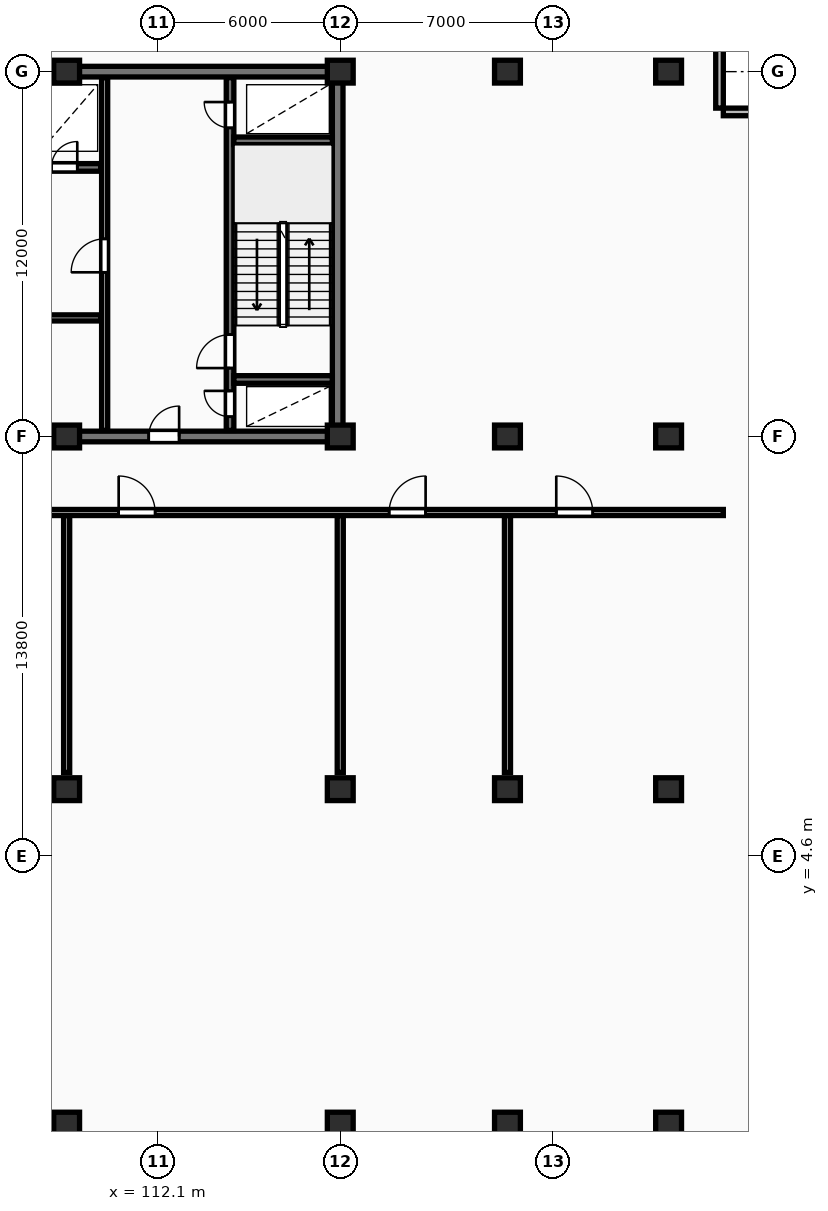
"""IFC4 building model, lengths in metres.
Left out: names, types, materials, properties, quantities, classifications, styles, units other than length and angle.
Written with IfcOpenShell. Run it as: python <this file> out.ifc"""

import sys

from ifc_helpers import new_model, si_unit, direction, frame, frame_2d, origin, origin_2d, place, context, subcontext, project, spatial, rectangle, extrude, element, fill, save


model = new_model("IFC4")
c1 = context("Model", 3, precision=1e-05, world=origin(), true_north=direction((0.0, 1.0)))
c2 = subcontext(c1, "Body", "Model", "MODEL_VIEW")
j1 = project(units=[si_unit("LENGTHUNIT", "METRE"), si_unit("PLANEANGLEUNIT", "RADIAN")], contexts=[c1])
p1 = place(None, origin())
s1 = spatial("IfcSite", under=j1, at=p1, CompositionType="ELEMENT")
p2 = place(p1, origin())
s2 = spatial("IfcBuilding", under=s1, at=p2, CompositionType="ELEMENT")
p3 = place(p2, frame((0.0, 0.0, 157.3)))
s3 = spatial("IfcBuildingStorey", under=s2, at=p3, CompositionType="ELEMENT", Elevation=157.3)
for number, where, z_axis, x_axis in (
    (1, (109.1, -4.2, 0.0), (0.0, 0.0, 1.0), (1.0, 0.0, 0.0)),
    (2, (109.1, 6.8, 0.0), (0.0, 0.0, 1.0), (1.0, 0.0, 0.0)),
    (3, (109.1, 18.4, 0.0), (0.0, 0.0, 1.0), (1.0, 0.0, 0.0)),
    (4, (109.1, 30.4, 0.0), (0.0, 0.0, 1.0), (1.0, 0.0, 0.0)),
    (5, (118.1, -4.2, 0.0), (0.0, 0.0, 1.0), (1.0, 0.0, 0.0)),
    (6, (118.1, 6.8, 0.0), (0.0, 0.0, 1.0), (1.0, 0.0, 0.0)),
    (7, (118.1, 18.4, 0.0), (0.0, 0.0, 1.0), (1.0, 0.0, 0.0)),
    (8, (118.1, 30.4, 0.0), (0.0, 0.0, 1.0), (1.0, 0.0, 0.0)),
    (9, (123.6, -4.2, 0.0), (0.0, 0.0, 1.0), (1.0, 0.0, 0.0)),
    (10, (123.6, 6.8, 0.0), (0.0, 0.0, 1.0), (1.0, 0.0, 0.0)),
    (11, (123.6, 18.4, 0.0), (0.0, 0.0, 1.0), (1.0, 0.0, 0.0)),
    (12, (123.6, 30.4, 0.0), (0.0, 0.0, 1.0), (1.0, 0.0, 0.0)),
    (13, (128.9, -4.2, 0.0), (0.0, 0.0, 1.0), (1.0, 0.0, 0.0)),
    (14, (128.9, 6.8, 0.0), (0.0, 0.0, 1.0), (1.0, 0.0, 0.0)),
    (15, (128.9, 18.4, 0.0), (0.0, 0.0, 1.0), (1.0, 0.0, 0.0)),
    (16, (128.9, 30.4, 0.0), (0.0, 0.0, 1.0), (1.0, 0.0, 0.0)),
):
    element("IfcColumn", number, at=place(p3, frame(where, z_axis=z_axis, x_axis=x_axis)), inside=s3, PredefinedType="COLUMN", context=c2, shape_type="SweptSolid", body=[
        extrude(rectangle(XDim=0.85, YDim=0.75, at=origin_2d()), origin(), (0.0, 0.0, 1.0), 4.8),
    ])
for number, where, z_axis, x_axis in (
    (17, (134.3, 29.075, 0.0), (0.0, 0.0, 1.0), (-1.0, 0.0, 0.0)),
    (18, (130.575, 29.2, 0.0), (0.0, 0.0, 1.0), (0.0, 1.0, 0.0)),
):
    element("IfcWall", number, at=place(p3, frame(where, z_axis=z_axis, x_axis=x_axis)), inside=s3, PredefinedType="SHEAR", context=c2, shape_type="SweptSolid", body=[
        extrude(rectangle(XDim=3.6, YDim=0.25, at=frame_2d((1.8, 0.0))), origin(), (0.0, 0.0, 1.0), 4.48),
    ])
p4 = place(p3, frame((81.925, 30.4, 0.0), z_axis=(0.0, 0.0, 1.0), x_axis=(1.0, 0.0, 0.0)))
e19 = element("IfcWall", 19, at=p4, inside=s3, PredefinedType="SHEAR", context=c2, shape_type="SweptSolid", body=[
    extrude(rectangle(XDim=36.265, YDim=0.35, at=frame_2d((18.132, 0.0))), origin(), (0.0, 0.0, 1.0), 4.8),
])
p5 = place(p3, frame((118.015, 18.575, 0.0), z_axis=(0.0, 0.0, 1.0), x_axis=(0.0, 1.0, 0.0)))
e20 = element("IfcWall", 20, at=p5, inside=s3, PredefinedType="SHEAR", context=c2, shape_type="SweptSolid", body=[
    extrude(rectangle(XDim=11.65, YDim=0.35, at=frame_2d((5.825, 0.0))), origin(), (0.0, 0.0, 1.0), 4.8),
])
p6 = place(p3, frame((81.925, 18.4, 0.0), z_axis=(0.0, 0.0, 1.0), x_axis=(1.0, 0.0, 0.0)))
e21 = element("IfcWall", 21, at=p6, inside=s3, PredefinedType="SHEAR", context=c2, shape_type="SweptSolid", body=[
    extrude(rectangle(XDim=36.265, YDim=0.35, at=frame_2d((18.132, 0.0))), origin(), (0.0, 0.0, 1.0), 4.8),
])
p7 = place(p6, frame((5.675, 0.0, 0.0)))
e22 = element("IfcOpeningElement", 22, at=p7, cuts=e21, PredefinedType="OPENING", context=c2, shape_type="SweptSolid", body=[
    extrude(rectangle(XDim=1.0, YDim=2.15, at=frame_2d((0.5, 1.075))), frame((0.0, 0.185, 0.0), z_axis=(0.0, -1.0, 0.0), x_axis=(1.0, 0.0, 0.0)), (0.0, 0.0, 1.0), 0.37),
])
p8 = place(p6, frame((21.925, 0.0, 0.0)))
e23 = element("IfcOpeningElement", 23, at=p8, cuts=e21, PredefinedType="OPENING", context=c2, shape_type="SweptSolid", body=[
    extrude(rectangle(XDim=1.5, YDim=2.2, at=frame_2d((0.75, 1.1))), frame((0.0, 0.185, 0.0), z_axis=(0.0, -1.0, 0.0), x_axis=(1.0, 0.0, 0.0)), (0.0, 0.0, 1.0), 0.37),
])
p9 = place(p6, frame((29.875, 0.0, 0.0)))
e24 = element("IfcOpeningElement", 24, at=p9, cuts=e21, PredefinedType="OPENING", context=c2, shape_type="SweptSolid", body=[
    extrude(rectangle(XDim=1.0, YDim=2.15, at=frame_2d((0.5, 1.075))), frame((0.0, 0.185, 0.0), z_axis=(0.0, -1.0, 0.0), x_axis=(1.0, 0.0, 0.0)), (0.0, 0.0, 1.0), 0.37),
])
p10 = place(p3, frame((99.68, 27.25, 0.0), z_axis=(0.0, 0.0, 1.0), x_axis=(1.0, 0.0, 0.0)))
e25 = element("IfcWall", 25, at=p10, inside=s3, PredefinedType="SHEAR", context=c2, shape_type="SweptSolid", body=[
    extrude(rectangle(XDim=10.54, YDim=0.25, at=frame_2d((5.27, 0.0))), origin(), (0.0, 0.0, 1.0), 4.8),
])
p11 = place(p10, frame((0.76, 0.0, 0.0)))
e26 = element("IfcOpeningElement", 26, at=p11, cuts=e25, PredefinedType="OPENING", context=c2, shape_type="SweptSolid", body=[
    extrude(rectangle(XDim=1.12, YDim=2.12, at=frame_2d((0.56, 1.06))), frame((0.0, 0.135, 0.0), z_axis=(0.0, -1.0, 0.0), x_axis=(1.0, 0.0, 0.0)), (0.0, 0.0, 1.0), 0.27),
])
p12 = place(p10, frame((3.56, 0.0, 0.0)))
e27 = element("IfcOpeningElement", 27, at=p12, cuts=e25, PredefinedType="OPENING", context=c2, shape_type="SweptSolid", body=[
    extrude(rectangle(XDim=1.12, YDim=2.12, at=frame_2d((0.56, 1.06))), frame((0.0, 0.135, 0.0), z_axis=(0.0, -1.0, 0.0), x_axis=(1.0, 0.0, 0.0)), (0.0, 0.0, 1.0), 0.27),
])
p13 = place(p10, frame((6.36, 0.0, 0.0)))
e28 = element("IfcOpeningElement", 28, at=p13, cuts=e25, PredefinedType="OPENING", context=c2, shape_type="SweptSolid", body=[
    extrude(rectangle(XDim=1.12, YDim=2.12, at=frame_2d((0.56, 1.06))), frame((0.0, 0.135, 0.0), z_axis=(0.0, -1.0, 0.0), x_axis=(1.0, 0.0, 0.0)), (0.0, 0.0, 1.0), 0.27),
])
p14 = place(p10, frame((8.92, 0.0, 0.0)))
e29 = element("IfcOpeningElement", 29, at=p14, cuts=e25, PredefinedType="OPENING", context=c2, shape_type="SweptSolid", body=[
    extrude(rectangle(XDim=0.85, YDim=2.05, at=frame_2d((0.425, 1.025))), frame((0.0, 0.135, 0.0), z_axis=(0.0, -1.0, 0.0), x_axis=(1.0, 0.0, 0.0)), (0.0, 0.0, 1.0), 0.27),
])
p15 = place(p3, frame((91.08, 22.3, 0.0), z_axis=(0.0, 0.0, 1.0), x_axis=(1.0, 0.0, 0.0)))
e30 = element("IfcWall", 30, at=p15, inside=s3, PredefinedType="PARTITIONING", context=c2, shape_type="SweptSolid", body=[
    extrude(rectangle(XDim=19.14, YDim=0.2, at=frame_2d((9.57, 0.0))), origin(), (0.0, 0.0, 1.0), 4.48),
])
p16 = place(p15, frame((1.15, 0.0, 0.0)))
e31 = element("IfcOpeningElement", 31, at=p16, cuts=e30, PredefinedType="OPENING", context=c2, shape_type="SweptSolid", body=[
    extrude(rectangle(XDim=0.85, YDim=2.05, at=frame_2d((0.425, 1.025))), frame((0.0, 0.11, 0.0), z_axis=(0.0, -1.0, 0.0), x_axis=(1.0, 0.0, 0.0)), (0.0, 0.0, 1.0), 0.22),
])
p17 = place(p15, frame((3.2, 0.0, 0.0)))
e32 = element("IfcOpeningElement", 32, at=p17, cuts=e30, PredefinedType="OPENING", context=c2, shape_type="SweptSolid", body=[
    extrude(rectangle(XDim=0.85, YDim=2.05, at=frame_2d((0.425, 1.025))), frame((0.0, 0.11, 0.0), z_axis=(0.0, -1.0, 0.0), x_axis=(1.0, 0.0, 0.0)), (0.0, 0.0, 1.0), 0.22),
])
p18 = place(p15, frame((12.72, 0.0, 0.0)))
e33 = element("IfcOpeningElement", 33, at=p18, cuts=e30, PredefinedType="OPENING", context=c2, shape_type="SweptSolid", body=[
    extrude(rectangle(XDim=1.5, YDim=2.2, at=frame_2d((0.75, 1.1))), frame((0.0, 0.11, 0.0), z_axis=(0.0, -1.0, 0.0), x_axis=(1.0, 0.0, 0.0)), (0.0, 0.0, 1.0), 0.22),
])
p19 = place(p15, frame((5.52, 0.0, 0.0)))
e34 = element("IfcOpeningElement", 34, at=p19, cuts=e30, PredefinedType="OPENING", context=c2, shape_type="SweptSolid", body=[
    extrude(rectangle(XDim=0.88, YDim=2.06, at=frame_2d((0.44, 1.03))), frame((0.0, 0.11, 0.0), z_axis=(0.0, -1.0, 0.0), x_axis=(1.0, 0.0, 0.0)), (0.0, 0.0, 1.0), 0.22),
])
p20 = place(p15, frame((7.67, 0.0, 0.0)))
e35 = element("IfcOpeningElement", 35, at=p20, cuts=e30, PredefinedType="OPENING", context=c2, shape_type="SweptSolid", body=[
    extrude(rectangle(XDim=0.88, YDim=2.06, at=frame_2d((0.44, 1.03))), frame((0.0, 0.11, 0.0), z_axis=(0.0, -1.0, 0.0), x_axis=(1.0, 0.0, 0.0)), (0.0, 0.0, 1.0), 0.22),
])
p21 = place(p15, frame((10.27, 0.0, 0.0)))
e36 = element("IfcOpeningElement", 36, at=p21, cuts=e30, PredefinedType="OPENING", context=c2, shape_type="SweptSolid", body=[
    extrude(rectangle(XDim=0.85, YDim=2.05, at=frame_2d((0.425, 1.025))), frame((0.0, 0.11, 0.0), z_axis=(0.0, -1.0, 0.0), x_axis=(1.0, 0.0, 0.0)), (0.0, 0.0, 1.0), 0.22),
])
p22 = place(p15, frame((15.92, 0.0, 0.0)))
e37 = element("IfcOpeningElement", 37, at=p22, cuts=e30, PredefinedType="OPENING", context=c2, shape_type="SweptSolid", body=[
    extrude(rectangle(XDim=0.96, YDim=2.1, at=frame_2d((0.48, 1.05))), frame((0.0, 0.11, 0.0), z_axis=(0.0, -1.0, 0.0), x_axis=(1.0, 0.0, 0.0)), (0.0, 0.0, 1.0), 0.22),
])
p23 = place(p3, frame((110.35, 18.6, 0.0), z_axis=(0.0, 0.0, 1.0), x_axis=(0.0, 1.0, 0.0)))
e38 = element("IfcWall", 38, at=p23, inside=s3, PredefinedType="PARTITIONING", context=c2, shape_type="SweptSolid", body=[
    extrude(rectangle(XDim=11.6, YDim=0.2, at=frame_2d((5.8, 0.0))), origin(), (0.0, 0.0, 1.0), 4.48),
])
p24 = place(p23, frame((5.2, 0.0, 0.0)))
e39 = element("IfcOpeningElement", 39, at=p24, cuts=e38, PredefinedType="OPENING", context=c2, shape_type="SweptSolid", body=[
    extrude(rectangle(XDim=1.1, YDim=2.15, at=frame_2d((0.55, 1.075))), frame((0.0, 0.11, 0.0), z_axis=(0.0, -1.0, 0.0), x_axis=(1.0, 0.0, 0.0)), (0.0, 0.0, 1.0), 0.22),
])
p25 = place(p3, frame((114.475, 18.6, 0.0), z_axis=(0.0, 0.0, 1.0), x_axis=(0.0, 1.0, 0.0)))
e40 = element("IfcWall", 40, at=p25, inside=s3, PredefinedType="SHEAR", context=c2, shape_type="SweptSolid", body=[
    extrude(rectangle(XDim=11.6, YDim=0.25, at=frame_2d((5.8, 0.0))), origin(), (0.0, 0.0, 1.0), 4.8),
])
p26 = place(p25, frame((0.45, 0.0, 0.0)))
e41 = element("IfcOpeningElement", 41, at=p26, cuts=e40, PredefinedType="OPENING", context=c2, shape_type="SweptSolid", body=[
    extrude(rectangle(XDim=0.85, YDim=2.05, at=frame_2d((0.425, 1.025))), frame((0.0, 0.135, 0.0), z_axis=(0.0, -1.0, 0.0), x_axis=(1.0, 0.0, 0.0)), (0.0, 0.0, 1.0), 0.27),
])
p27 = place(p25, frame((2.05, 0.0, 0.0)))
e42 = element("IfcOpeningElement", 42, at=p27, cuts=e40, PredefinedType="OPENING", context=c2, shape_type="SweptSolid", body=[
    extrude(rectangle(XDim=1.1, YDim=2.1, at=frame_2d((0.55, 1.05))), frame((0.0, 0.135, 0.0), z_axis=(0.0, -1.0, 0.0), x_axis=(1.0, 0.0, 0.0)), (0.0, 0.0, 1.0), 0.27),
])
p28 = place(p25, frame((9.95, 0.0, 0.0)))
e43 = element("IfcOpeningElement", 43, at=p28, cuts=e40, PredefinedType="OPENING", context=c2, shape_type="SweptSolid", body=[
    extrude(rectangle(XDim=0.85, YDim=2.05, at=frame_2d((0.425, 1.025))), frame((0.0, 0.135, 0.0), z_axis=(0.0, -1.0, 0.0), x_axis=(1.0, 0.0, 0.0)), (0.0, 0.0, 1.0), 0.27),
])
for number, where, z_axis, x_axis in (
    (44, (114.6, 20.275, 0.0), (0.0, 0.0, 1.0), (1.0, 0.0, 0.0)),
    (45, (114.6, 28.125, 0.0), (0.0, 0.0, 1.0), (1.0, 0.0, 0.0)),
):
    element("IfcWall", number, at=place(p3, frame(where, z_axis=z_axis, x_axis=x_axis)), inside=s3, PredefinedType="SHEAR", context=c2, shape_type="SweptSolid", body=[
        extrude(rectangle(XDim=3.24, YDim=0.25, at=frame_2d((1.62, 0.0))), origin(), (0.0, 0.0, 1.0), 4.8),
    ])
for number, where, z_axis, x_axis in (
    (46, (109.1, 7.35, 0.0), (0.0, 0.0, 1.0), (0.0, 1.0, 0.0)),
    (47, (118.1, 7.35, 0.0), (0.0, 0.0, 1.0), (0.0, 1.0, 0.0)),
    (48, (123.6, 7.35, 0.0), (0.0, 0.0, 1.0), (0.0, 1.0, 0.0)),
):
    element("IfcWall", number, at=place(p3, frame(where, z_axis=z_axis, x_axis=x_axis)), inside=s3, PredefinedType="PARTITIONING", context=c2, shape_type="SweptSolid", body=[
        extrude(rectangle(XDim=8.45, YDim=0.2, at=frame_2d((4.225, 0.0))), origin(), (0.0, 0.0, 1.0), 3.33),
    ])
p29 = place(p3, frame((72.7, 15.9, 0.0), z_axis=(0.0, 0.0, 1.0), x_axis=(1.0, 0.0, 0.0)))
e49 = element("IfcWall", 49, at=p29, inside=s3, PredefinedType="PARTITIONING", context=c2, shape_type="SweptSolid", body=[
    extrude(rectangle(XDim=58.0, YDim=0.2, at=frame_2d((29.0, 0.0))), origin(), (0.0, 0.0, 1.0), 4.48),
])
p30 = place(p29, frame((6.262, 0.0, 0.0)))
e50 = element("IfcOpeningElement", 50, at=p30, cuts=e49, PredefinedType="OPENING", context=c2, shape_type="SweptSolid", body=[
    extrude(rectangle(XDim=1.5, YDim=2.18, at=frame_2d((0.75, 1.09))), frame((0.0, 0.11, 0.0), z_axis=(0.0, -1.0, 0.0), x_axis=(1.0, 0.0, 0.0)), (0.0, 0.0, 1.0), 0.22),
])
p31 = place(p29, frame((15.489, 0.0, 0.0)))
e51 = element("IfcOpeningElement", 51, at=p31, cuts=e49, PredefinedType="OPENING", context=c2, shape_type="SweptSolid", body=[
    extrude(rectangle(XDim=1.2, YDim=2.15, at=frame_2d((0.6, 1.075))), frame((0.0, 0.11, 0.0), z_axis=(0.0, -1.0, 0.0), x_axis=(1.0, 0.0, 0.0)), (0.0, 0.0, 1.0), 0.22),
])
p32 = place(p29, frame((24.489, 0.0, 0.0)))
e52 = element("IfcOpeningElement", 52, at=p32, cuts=e49, PredefinedType="OPENING", context=c2, shape_type="SweptSolid", body=[
    extrude(rectangle(XDim=1.2, YDim=2.15, at=frame_2d((0.6, 1.075))), frame((0.0, 0.11, 0.0), z_axis=(0.0, -1.0, 0.0), x_axis=(1.0, 0.0, 0.0)), (0.0, 0.0, 1.0), 0.22),
])
p33 = place(p29, frame((29.111, 0.0, 0.0)))
e53 = element("IfcOpeningElement", 53, at=p33, cuts=e49, PredefinedType="OPENING", context=c2, shape_type="SweptSolid", body=[
    extrude(rectangle(XDim=1.2, YDim=2.15, at=frame_2d((0.6, 1.075))), frame((0.0, 0.11, 0.0), z_axis=(0.0, -1.0, 0.0), x_axis=(1.0, 0.0, 0.0)), (0.0, 0.0, 1.0), 0.22),
])
p34 = place(p29, frame((38.111, 0.0, 0.0)))
e54 = element("IfcOpeningElement", 54, at=p34, cuts=e49, PredefinedType="OPENING", context=c2, shape_type="SweptSolid", body=[
    extrude(rectangle(XDim=1.2, YDim=2.15, at=frame_2d((0.6, 1.075))), frame((0.0, 0.11, 0.0), z_axis=(0.0, -1.0, 0.0), x_axis=(1.0, 0.0, 0.0)), (0.0, 0.0, 1.0), 0.22),
])
p35 = place(p29, frame((47.008, 0.0, 0.0)))
e55 = element("IfcOpeningElement", 55, at=p35, cuts=e49, PredefinedType="OPENING", context=c2, shape_type="SweptSolid", body=[
    extrude(rectangle(XDim=1.2, YDim=2.15, at=frame_2d((0.6, 1.075))), frame((0.0, 0.11, 0.0), z_axis=(0.0, -1.0, 0.0), x_axis=(1.0, 0.0, 0.0)), (0.0, 0.0, 1.0), 0.22),
])
p36 = place(p29, frame((52.505, 0.0, 0.0)))
e56 = element("IfcOpeningElement", 56, at=p36, cuts=e49, PredefinedType="OPENING", context=c2, shape_type="SweptSolid", body=[
    extrude(rectangle(XDim=1.2, YDim=2.15, at=frame_2d((0.6, 1.075))), frame((0.0, 0.11, 0.0), z_axis=(0.0, -1.0, 0.0), x_axis=(1.0, 0.0, 0.0)), (0.0, 0.0, 1.0), 0.22),
])
p37 = place(p9, origin())
e57 = element("IfcDoor", 57, at=p37, inside=s3, OperationType="SINGLE_SWING_RIGHT", PredefinedType="DOOR", context=c2, shape_type="SweptSolid", body=[
    extrude(rectangle(XDim=1.0, YDim=2.15, at=frame_2d((0.5, 1.075))), frame((0.0, 0.025, 0.0), z_axis=(0.0, -1.0, 0.0), x_axis=(1.0, 0.0, 0.0)), (0.0, 0.0, 1.0), 0.05),
])
fill(e24, e57)
p38 = place(p14, origin())
e58 = element("IfcDoor", 58, at=p38, inside=s3, OperationType="SINGLE_SWING_RIGHT", PredefinedType="DOOR", context=c2, shape_type="SweptSolid", body=[
    extrude(rectangle(XDim=0.85, YDim=2.05, at=frame_2d((0.425, 1.025))), frame((0.0, 0.025, 0.0), z_axis=(0.0, -1.0, 0.0), x_axis=(1.0, 0.0, 0.0)), (0.0, 0.0, 1.0), 0.05),
])
fill(e29, e58)
p39 = place(p24, origin())
e59 = element("IfcDoor", 59, at=p39, inside=s3, OperationType="SINGLE_SWING_LEFT", PredefinedType="DOOR", context=c2, shape_type="SweptSolid", body=[
    extrude(rectangle(XDim=1.1, YDim=2.15, at=frame_2d((0.55, 1.075))), frame((0.0, 0.025, 0.0), z_axis=(0.0, -1.0, 0.0), x_axis=(1.0, 0.0, 0.0)), (0.0, 0.0, 1.0), 0.05),
])
fill(e39, e59)
p40 = place(p26, origin())
e60 = element("IfcDoor", 60, at=p40, inside=s3, OperationType="SINGLE_SWING_RIGHT", PredefinedType="DOOR", context=c2, shape_type="SweptSolid", body=[
    extrude(rectangle(XDim=0.85, YDim=2.05, at=frame_2d((0.425, 1.025))), frame((0.0, 0.025, 0.0), z_axis=(0.0, -1.0, 0.0), x_axis=(1.0, 0.0, 0.0)), (0.0, 0.0, 1.0), 0.05),
])
fill(e41, e60)
p41 = place(p27, origin())
e61 = element("IfcDoor", 61, at=p41, inside=s3, OperationType="SINGLE_SWING_LEFT", PredefinedType="DOOR", context=c2, shape_type="SweptSolid", body=[
    extrude(rectangle(XDim=1.1, YDim=2.1, at=frame_2d((0.55, 1.05))), frame((0.0, 0.025, 0.0), z_axis=(0.0, -1.0, 0.0), x_axis=(1.0, 0.0, 0.0)), (0.0, 0.0, 1.0), 0.05),
])
fill(e42, e61)
p42 = place(p28, origin())
e62 = element("IfcDoor", 62, at=p42, inside=s3, OperationType="SINGLE_SWING_RIGHT", PredefinedType="DOOR", context=c2, shape_type="SweptSolid", body=[
    extrude(rectangle(XDim=0.85, YDim=2.05, at=frame_2d((0.425, 1.025))), frame((0.0, 0.025, 0.0), z_axis=(0.0, -1.0, 0.0), x_axis=(1.0, 0.0, 0.0)), (0.0, 0.0, 1.0), 0.05),
])
fill(e43, e62)
p43 = place(p34, origin())
e63 = element("IfcDoor", 63, at=p43, inside=s3, OperationType="SINGLE_SWING_LEFT", PredefinedType="DOOR", context=c2, shape_type="SweptSolid", body=[
    extrude(rectangle(XDim=1.2, YDim=2.15, at=frame_2d((0.6, 1.075))), frame((0.0, 0.025, 0.0), z_axis=(0.0, -1.0, 0.0), x_axis=(1.0, 0.0, 0.0)), (0.0, 0.0, 1.0), 0.05),
])
fill(e54, e63)
p44 = place(p35, origin())
e64 = element("IfcDoor", 64, at=p44, inside=s3, OperationType="SINGLE_SWING_RIGHT", PredefinedType="DOOR", context=c2, shape_type="SweptSolid", body=[
    extrude(rectangle(XDim=1.2, YDim=2.15, at=frame_2d((0.6, 1.075))), frame((0.0, 0.025, 0.0), z_axis=(0.0, -1.0, 0.0), x_axis=(1.0, 0.0, 0.0)), (0.0, 0.0, 1.0), 0.05),
])
fill(e55, e64)
p45 = place(p36, origin())
e65 = element("IfcDoor", 65, at=p45, inside=s3, OperationType="SINGLE_SWING_LEFT", PredefinedType="DOOR", context=c2, shape_type="SweptSolid", body=[
    extrude(rectangle(XDim=1.2, YDim=2.15, at=frame_2d((0.6, 1.075))), frame((0.0, 0.025, 0.0), z_axis=(0.0, -1.0, 0.0), x_axis=(1.0, 0.0, 0.0)), (0.0, 0.0, 1.0), 0.05),
])
fill(e56, e65)
save(model, sys.argv[1])
